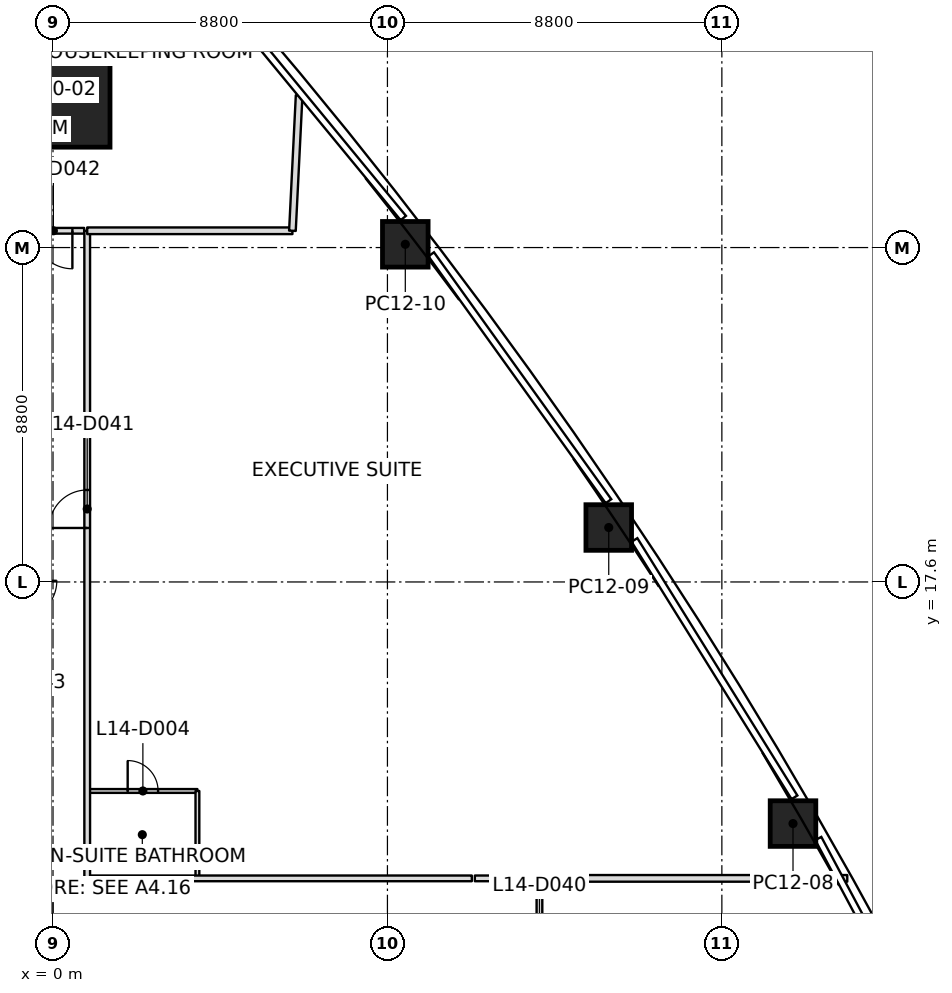
"""IFC4 building model, lengths in metres.
Left out: names, types, materials, properties, quantities, classifications, styles, units other than length and angle.
Written with IfcOpenShell. Run it as: python <this file> out.ifc"""

import sys

from ifc_helpers import new_model, si_unit, direction, frame, frame_2d, origin, origin_2d, place, context, subcontext, project, spatial, rectangle, extrude, element, fill, save


model = new_model("IFC4")
c1 = context("Model", 3, precision=1e-05, world=origin(), true_north=direction((0.0, 1.0)))
c2 = subcontext(c1, "Body", "Model", "MODEL_VIEW")
j1 = project(units=[si_unit("LENGTHUNIT", "METRE"), si_unit("PLANEANGLEUNIT", "RADIAN")], contexts=[c1])
p1 = place(None, origin())
s1 = spatial("IfcSite", under=j1, at=p1, CompositionType="ELEMENT")
p2 = place(p1, origin())
s2 = spatial("IfcBuilding", under=s1, at=p2, CompositionType="ELEMENT")
p3 = place(p2, frame((0.0, 0.0, 73.9)))
s3 = spatial("IfcBuildingStorey", under=s2, at=p3, CompositionType="ELEMENT", Elevation=73.9)
p4 = place(p3, frame((0.0, 30.542, 0.0), z_axis=(0.0, -0.035277579215, 0.999377552482), x_axis=(1.0, 0.0, 0.0)))
e1 = element("IfcColumn", 1, at=p4, inside=s3, PredefinedType="COLUMN", context=c2, shape_type="SweptSolid", body=[
    extrude(rectangle(XDim=3.0, YDim=3.0, at=origin_2d()), origin(), (0.0, 0.0, 1.0), 3.702),
])
p5 = place(p3, frame((19.472, 11.242, 0.0), z_axis=(-0.010688020009, -0.006201690622, 0.999923649716), x_axis=(-0.499971440741, 0.866041891424, 2.7221193e-05)))
e2 = element("IfcColumn", 2, at=p5, inside=s3, PredefinedType="COLUMN", context=c2, shape_type="SweptSolid", body=[
    extrude(rectangle(XDim=1.2, YDim=1.2, at=origin_2d()), origin(), (0.0, 0.0, 1.0), 3.7),
])
p6 = place(p3, frame((14.623, 19.033, 0.0), z_axis=(-0.005673642186, -0.014382023216, 0.999880476453), x_axis=(-0.556182234491, 0.831013798021, 0.008797132212)))
e3 = element("IfcColumn", 3, at=p6, inside=s3, PredefinedType="COLUMN", context=c2, shape_type="SweptSolid", body=[
    extrude(rectangle(XDim=1.2, YDim=1.2, at=origin_2d()), origin(), (0.0, 0.0, 1.0), 3.701),
])
p7 = place(p3, frame((9.27, 26.486, 0.0), z_axis=(-0.000197891909, -0.02236178572, 0.99974992442), x_axis=(-0.609946008584, 0.792247508558, 0.017599766916)))
e4 = element("IfcColumn", 4, at=p7, inside=s3, PredefinedType="COLUMN", context=c2, shape_type="SweptSolid", body=[
    extrude(rectangle(XDim=1.2, YDim=1.2, at=origin_2d()), origin(), (0.0, 0.0, 1.0), 3.701),
])
p8 = place(p3, frame((0.9, 26.842, 0.0), z_axis=(0.0, 0.0, 1.0), x_axis=(1.0, 0.0, 0.0)))
e5 = element("IfcWall", 5, at=p8, inside=s3, PredefinedType="PARTITIONING", context=c2, shape_type="SweptSolid", body=[
    extrude(rectangle(XDim=5.4, YDim=0.175, at=frame_2d((2.7, 0.0))), origin(), (0.0, 0.0, 1.0), 3.15),
])
p9 = place(p3, frame((6.3, 26.842, 0.0), z_axis=(0.0, 0.0, 1.0), x_axis=(0.049548494215, 0.998771719023, 0.0)))
e6 = element("IfcWall", 6, at=p9, inside=s3, PredefinedType="PARTITIONING", context=c2, shape_type="SweptSolid", body=[
    extrude(rectangle(XDim=3.567, YDim=0.175, at=frame_2d((1.784, 0.0))), origin(), (0.0, 0.0, 1.0), 2.934),
])
p10 = place(p3, frame((20.9, 9.8, 0.0), z_axis=(0.0, 0.0, 1.0), x_axis=(-1.0, 0.0, 0.0)))
e7 = element("IfcWall", 7, at=p10, inside=s3, PredefinedType="PARTITIONING", context=c2, shape_type="SweptSolid", body=[
    extrude(rectangle(XDim=8.02, YDim=0.175, at=frame_2d((4.01, 0.0))), origin(), (0.0, 0.0, 1.0), 2.934),
])
p11 = place(p3, frame((0.82, 26.842, 0.0), z_axis=(0.0, 0.0, 1.0), x_axis=(-1.0, 0.0, 0.0)))
e8 = element("IfcWall", 8, at=p11, inside=s3, PredefinedType="PARTITIONING", context=c2, shape_type="SweptSolid", body=[
    extrude(rectangle(XDim=1.64, YDim=0.15, at=frame_2d((0.82, 0.0))), origin(), (0.0, 0.0, 1.0), 2.797),
])
p12 = place(p11, frame((0.31, 0.0, 0.0)))
e9 = element("IfcOpeningElement", 9, at=p12, cuts=e8, PredefinedType="OPENING", context=c2, shape_type="SweptSolid", body=[
    extrude(rectangle(XDim=1.0, YDim=2.1, at=frame_2d((0.5, 1.05))), frame((0.0, 0.075, 0.0), z_axis=(0.0, -1.0, 0.0), x_axis=(1.0, 0.0, 0.0)), (0.0, 0.0, 1.0), 0.15),
])
p13 = place(p3, frame((11.02, 9.8, 0.0), z_axis=(0.0, 0.0, 1.0), x_axis=(-1.0, 0.0, 0.0)))
e10 = element("IfcWall", 10, at=p13, inside=s3, PredefinedType="PARTITIONING", context=c2, shape_type="SweptSolid", body=[
    extrude(rectangle(XDim=10.12, YDim=0.15, at=frame_2d((5.06, 0.0))), origin(), (0.0, 0.0, 1.0), 2.947),
])
p14 = place(p3, frame((0.9, 9.8, 0.0), z_axis=(0.0, 0.0, 1.0), x_axis=(0.0, 1.0, 0.0)))
e11 = element("IfcWall", 11, at=p14, inside=s3, PredefinedType="PARTITIONING", context=c2, shape_type="SweptSolid", body=[
    extrude(rectangle(XDim=17.042, YDim=0.15, at=frame_2d((8.521, 0.0))), origin(), (0.0, 0.0, 1.0), 2.947),
])
p15 = place(p14, frame((9.221, 0.0, 0.0)))
e12 = element("IfcOpeningElement", 12, at=p15, cuts=e11, PredefinedType="OPENING", context=c2, shape_type="SweptSolid", body=[
    extrude(rectangle(XDim=1.0, YDim=2.1, at=frame_2d((0.5, 1.05))), frame((0.0, 0.075, 0.0), z_axis=(0.0, -1.0, 0.0), x_axis=(1.0, 0.0, 0.0)), (0.0, 0.0, 1.0), 0.15),
])
p16 = place(p3, frame((12.72, 9.8, 0.0), z_axis=(0.0, 0.0, 1.0), x_axis=(-1.0, 0.0, 0.0)))
e13 = element("IfcWall", 13, at=p16, inside=s3, PredefinedType="PARTITIONING", context=c2, shape_type="SweptSolid", body=[
    extrude(rectangle(XDim=1.62, YDim=0.15, at=frame_2d((0.81, 0.0))), origin(), (0.0, 0.0, 1.0), 3.15),
])
p17 = place(p3, frame((12.8, -6.351, 0.0), z_axis=(0.0, 0.0, 1.0), x_axis=(0.0, 1.0, 0.0)))
e14 = element("IfcWall", 14, at=p17, inside=s3, PredefinedType="PARTITIONING", context=c2, shape_type="SweptSolid", body=[
    extrude(rectangle(XDim=16.071, YDim=0.15, at=frame_2d((8.035, 0.0))), origin(), (0.0, 0.0, 1.0), 2.947),
])
p18 = place(p17, frame((13.251, 0.0, 0.0)))
e15 = element("IfcOpeningElement", 15, at=p18, cuts=e14, PredefinedType="OPENING", context=c2, shape_type="SweptSolid", body=[
    extrude(rectangle(XDim=1.0, YDim=2.1, at=frame_2d((0.5, 1.05))), frame((0.0, 0.075, 0.0), z_axis=(0.0, -1.0, 0.0), x_axis=(1.0, 0.0, 0.0)), (0.0, 0.0, 1.0), 0.15),
])
p19 = place(p17, frame((6.375, 0.0, 0.0)))
e16 = element("IfcOpeningElement", 16, at=p19, cuts=e14, PredefinedType="OPENING", context=c2, shape_type="SweptSolid", body=[
    extrude(rectangle(XDim=1.0, YDim=2.1, at=frame_2d((0.5, 1.05))), frame((0.0, 0.075, 0.0), z_axis=(0.0, -1.0, 0.0), x_axis=(1.0, 0.0, 0.0)), (0.0, 0.0, 1.0), 0.15),
])
p20 = place(p3, frame((0.93, 12.1, 0.0), z_axis=(0.0, 0.0, 1.0), x_axis=(1.0, 0.0, 0.0)))
e17 = element("IfcWall", 17, at=p20, inside=s3, PredefinedType="PARTITIONING", context=c2, shape_type="SweptSolid", body=[
    extrude(rectangle(XDim=2.87, YDim=0.1, at=frame_2d((1.435, 0.0))), origin(), (0.0, 0.0, 1.0), 3.15),
])
p21 = place(p20, frame((1.035, 0.0, 0.0)))
e18 = element("IfcOpeningElement", 18, at=p21, cuts=e17, PredefinedType="OPENING", context=c2, shape_type="SweptSolid", body=[
    extrude(rectangle(XDim=0.8, YDim=2.1, at=frame_2d((0.4, 1.05))), frame((0.0, 0.05, 0.0), z_axis=(0.0, -1.0, 0.0), x_axis=(1.0, 0.0, 0.0)), (0.0, 0.0, 1.0), 0.1),
])
p22 = place(p3, frame((3.8, 12.1, 0.0), z_axis=(0.0, 0.0, 1.0), x_axis=(0.0, -1.0, 0.0)))
e19 = element("IfcWall", 19, at=p22, inside=s3, PredefinedType="PARTITIONING", context=c2, shape_type="SweptSolid", body=[
    extrude(rectangle(XDim=2.27, YDim=0.1, at=frame_2d((1.135, 0.0))), origin(), (0.0, 0.0, 1.0), 3.15),
])
p23 = place(p15, origin())
e20 = element("IfcDoor", 20, at=p23, inside=s3, OperationType="SINGLE_SWING_LEFT", PredefinedType="DOOR", context=c2, shape_type="SweptSolid", body=[
    extrude(rectangle(XDim=1.0, YDim=2.1, at=frame_2d((0.5, 1.05))), frame((0.0, 0.025, 0.0), z_axis=(0.0, -1.0, 0.0), x_axis=(1.0, 0.0, 0.0)), (0.0, 0.0, 1.0), 0.05),
])
fill(e12, e20)
p24 = place(p21, origin())
e21 = element("IfcDoor", 21, at=p24, inside=s3, OperationType="SINGLE_SWING_LEFT", PredefinedType="DOOR", context=c2, shape_type="SweptSolid", body=[
    extrude(rectangle(XDim=0.8, YDim=2.1, at=frame_2d((0.4, 1.05))), frame((0.0, 0.025, 0.0), z_axis=(0.0, -1.0, 0.0), x_axis=(1.0, 0.0, 0.0)), (0.0, 0.0, 1.0), 0.05),
])
fill(e18, e21)
p25 = place(p12, origin())
e22 = element("IfcDoor", 22, at=p25, inside=s3, OperationType="SINGLE_SWING_LEFT", PredefinedType="DOOR", context=c2, shape_type="SweptSolid", body=[
    extrude(rectangle(XDim=1.0, YDim=2.1, at=frame_2d((0.5, 1.05))), frame((0.0, 0.025, 0.0), z_axis=(0.0, -1.0, 0.0), x_axis=(1.0, 0.0, 0.0)), (0.0, 0.0, 1.0), 0.05),
])
fill(e9, e22)
save(model, sys.argv[1])
